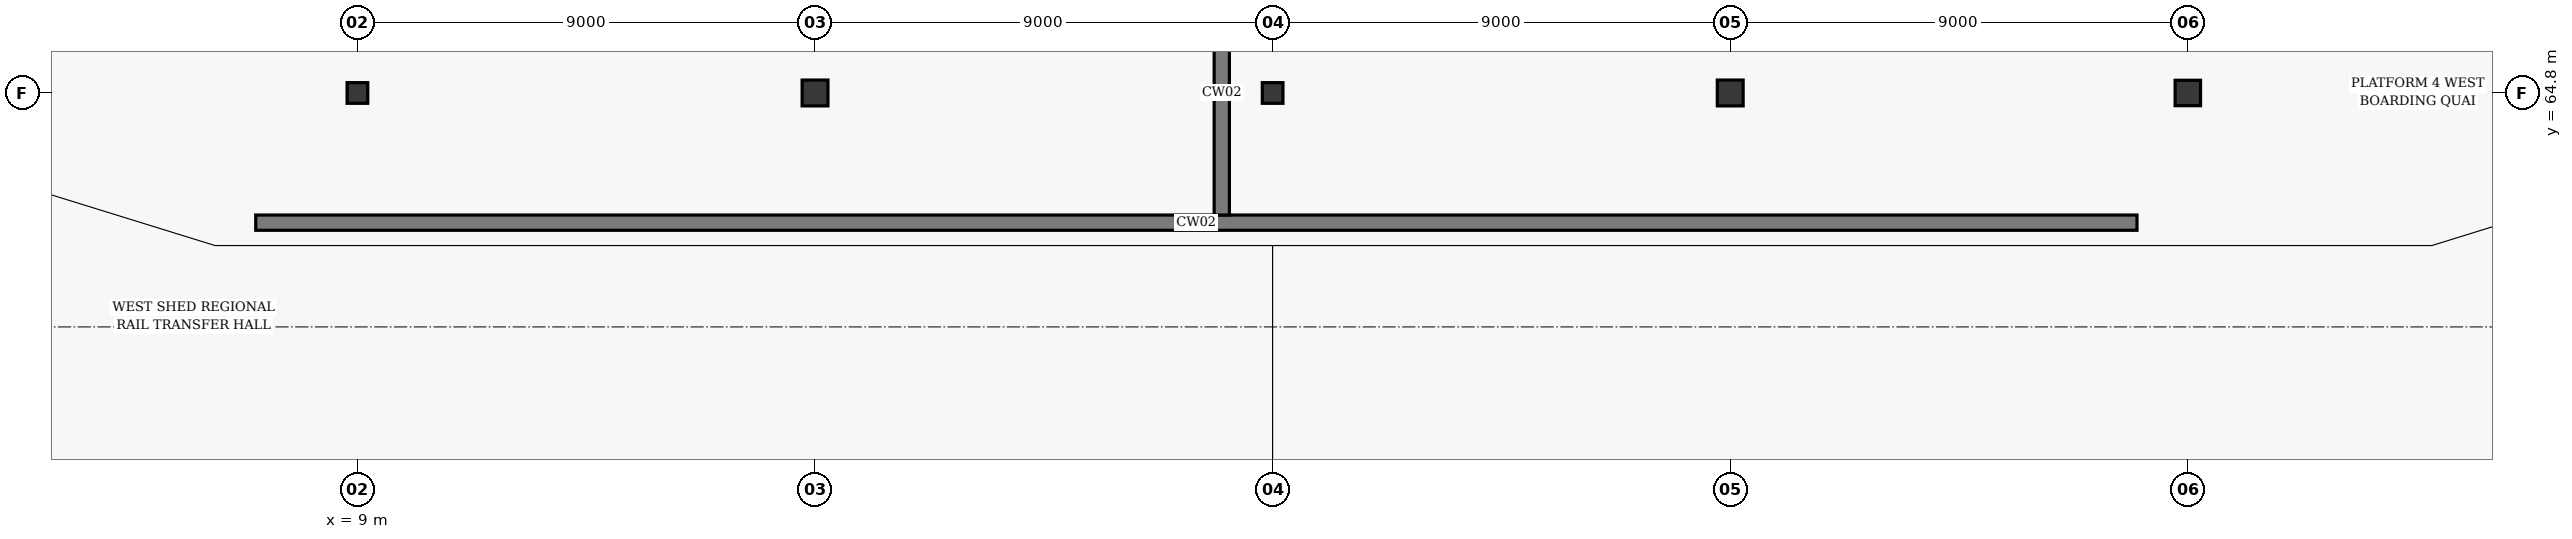
"""IFC4 building model, lengths in metres.
Left out: names, types, materials, properties, quantities, classifications, styles, units other than length and angle.
Written with IfcOpenShell. Run it as: python <this file> out.ifc"""

import sys

from ifc_helpers import new_model, si_unit, direction, frame, frame_2d, origin, origin_2d, place, context, subcontext, project, spatial, rectangle, hollow_rectangle, hollow_circle, extrude, element, save


model = new_model("IFC4")
c1 = context("Model", 3, precision=1e-05, world=origin(), true_north=direction((0.0, 1.0)))
c2 = subcontext(c1, "Body", "Model", "MODEL_VIEW")
j1 = project(units=[si_unit("LENGTHUNIT", "METRE"), si_unit("PLANEANGLEUNIT", "RADIAN")], contexts=[c1])
p1 = place(None, origin())
s1 = spatial("IfcSite", under=j1, at=p1, CompositionType="ELEMENT")
p2 = place(p1, origin())
s2 = spatial("IfcBuilding", under=s1, at=p2, CompositionType="ELEMENT")
p3 = place(p2, origin())
s3 = spatial("IfcBuildingStorey", under=s2, at=p3, CompositionType="ELEMENT", Elevation=0.0)
p4 = place(p3, frame((9.0, 64.8, 0.0), z_axis=(0.0, 0.0, 1.0), x_axis=(1.0, 0.0, 0.0)))
e1 = element("IfcColumn", 1, at=p4, inside=s3, PredefinedType="COLUMN", context=c2, shape_type="SweptSolid", body=[
    extrude(hollow_circle(Radius=0.203, WallThickness=0.014, at=origin_2d()), origin(), (0.0, 0.0, 1.0), 6.6),
])
p5 = place(p3, frame((18.0, 64.8, 0.0), z_axis=(0.0, 0.0, 1.0), x_axis=(1.0, 0.0, 0.0)))
e2 = element("IfcColumn", 2, at=p5, inside=s3, PredefinedType="COLUMN", context=c2, shape_type="SweptSolid", body=[
    extrude(hollow_circle(Radius=0.254, WallThickness=0.016, at=origin_2d()), origin(), (0.0, 0.0, 1.0), 6.6),
])
p6 = place(p3, frame((27.0, 64.8, 0.0), z_axis=(0.0, 0.0, 1.0), x_axis=(1.0, 0.0, 0.0)))
e3 = element("IfcColumn", 3, at=p6, inside=s3, PredefinedType="COLUMN", context=c2, shape_type="SweptSolid", body=[
    extrude(hollow_circle(Radius=0.203, WallThickness=0.014, at=origin_2d()), origin(), (0.0, 0.0, 1.0), 6.6),
])
p7 = place(p3, frame((36.0, 64.8, 0.0), z_axis=(0.0, 0.0, 1.0), x_axis=(1.0, 0.0, 0.0)))
e4 = element("IfcColumn", 4, at=p7, inside=s3, PredefinedType="COLUMN", context=c2, shape_type="SweptSolid", body=[
    extrude(hollow_circle(Radius=0.254, WallThickness=0.016, at=origin_2d()), origin(), (0.0, 0.0, 1.0), 6.6),
])
p8 = place(p3, frame((45.0, 64.8, 0.0), z_axis=(0.0, 0.0, 1.0), x_axis=(1.0, 0.0, 0.0)))
e5 = element("IfcColumn", 5, at=p8, inside=s3, PredefinedType="COLUMN", context=c2, shape_type="SweptSolid", body=[
    extrude(hollow_rectangle(XDim=0.5, YDim=0.5, WallThickness=0.02, at=origin_2d()), origin(), (0.0, 0.0, 1.0), 6.6),
])
p9 = place(p3, frame((7.0, 62.25, 0.0), z_axis=(0.0, 0.0, 1.0), x_axis=(1.0, 0.0, 0.0)))
e6 = element("IfcWall", 6, at=p9, inside=s3, PredefinedType="SOLIDWALL", context=c2, shape_type="SweptSolid", body=[
    extrude(rectangle(XDim=37.0, YDim=0.3, at=frame_2d((18.5, 0.0))), origin(), (0.0, 0.0, 1.0), 0.375),
])
p10 = place(p3, frame((26.0, 62.4, 0.0), z_axis=(0.0, 0.0, 1.0), x_axis=(0.0, 1.0, 0.0)))
e7 = element("IfcWall", 7, at=p10, inside=s3, PredefinedType="SOLIDWALL", context=c2, shape_type="SweptSolid", body=[
    extrude(rectangle(XDim=4.8, YDim=0.3, at=frame_2d((2.4, 0.0))), origin(), (0.0, 0.0, 1.0), 0.375),
])
save(model, sys.argv[1])
